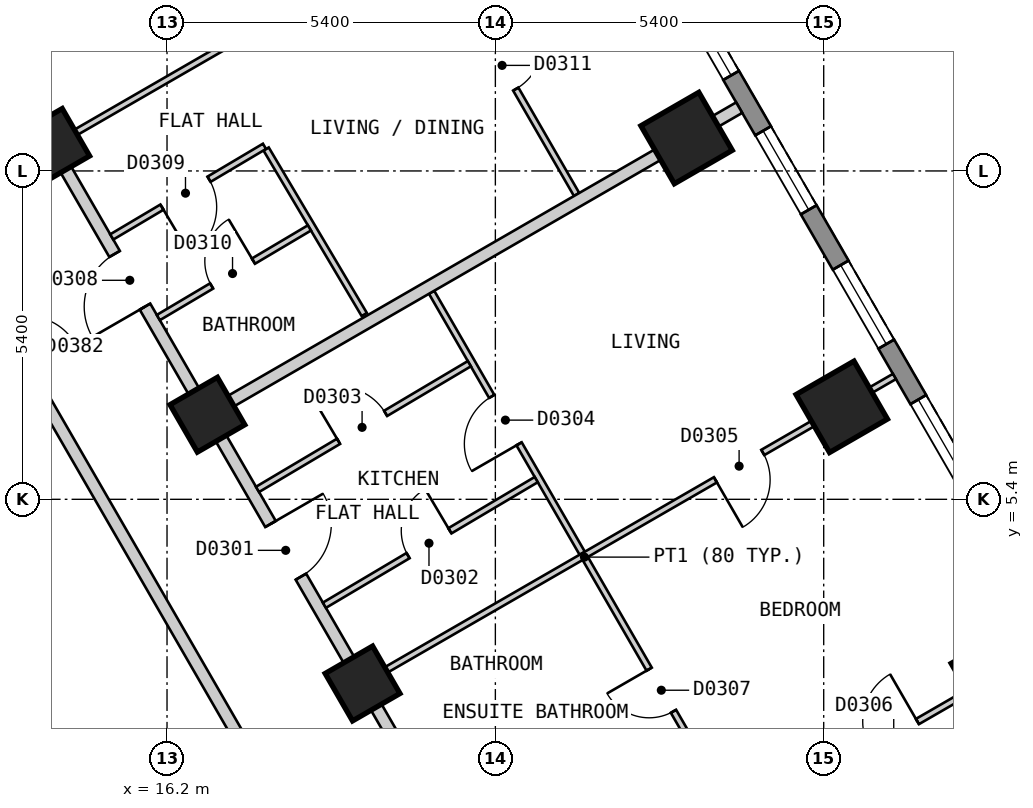
"""IFC4 building model, lengths in metres.
Left out: names, types, materials, properties, quantities, classifications, styles, units other than length and angle.
Written with IfcOpenShell. Run it as: python <this file> out.ifc"""

import sys

from ifc_helpers import new_model, si_unit, direction, frame, frame_2d, origin, origin_2d, place, context, subcontext, project, spatial, polyline, rectangle, outline, extrude, element, fill, save


model = new_model("IFC4")
c1 = context("Model", 3, precision=1e-05, world=origin(), true_north=direction((0.0, 1.0)))
c2 = subcontext(c1, "Body", "Model", "MODEL_VIEW")
j1 = project(units=[si_unit("LENGTHUNIT", "METRE"), si_unit("PLANEANGLEUNIT", "RADIAN")], contexts=[c1])
p1 = place(None, origin())
s1 = spatial("IfcSite", under=j1, at=p1, CompositionType="ELEMENT")
p2 = place(p1, origin())
s2 = spatial("IfcBuilding", under=s1, at=p2, CompositionType="ELEMENT")
p3 = place(p2, frame((0.0, 0.0, 59.4)))
s3 = spatial("IfcBuildingStorey", under=s2, at=p3, CompositionType="ELEMENT", Elevation=59.4)
for number, where, z_axis, x_axis in (
    (1, (29.848, 2.5, 0.0), (0.0, 0.0, 1.0), (-0.5, 0.866, 0.0)),
    (2, (27.297, 6.921, 0.0), (0.0, 0.0, 1.0), (-0.5, 0.866, 0.0)),
    (3, (24.745, 11.341, 0.0), (0.0, 0.0, 1.0), (-0.5, 0.866, 0.0)),
):
    element("IfcColumn", number, at=place(p3, frame(where, z_axis=z_axis, x_axis=x_axis)), inside=s3, PredefinedType="COLUMN", context=c2, shape_type="SweptSolid", body=[
        extrude(rectangle(XDim=1.1, YDim=1.1, at=origin_2d()), origin(), (0.0, 0.0, 1.0), 3.0),
    ])
for number, where, z_axis, x_axis in (
    (4, (19.416, 2.371, 0.0), (0.0, 0.0, 1.0), (-0.5, 0.866, 0.0)),
    (5, (16.864, 6.791, 0.0), (0.0, 0.0, 1.0), (-0.5, 0.866, 0.0)),
    (6, (14.312, 11.211, 0.0), (0.0, 0.0, 1.0), (-0.5, 0.866, 0.0)),
):
    element("IfcColumn", number, at=place(p3, frame(where, z_axis=z_axis, x_axis=x_axis)), inside=s3, PredefinedType="COLUMN", context=c2, shape_type="SweptSolid", body=[
        extrude(rectangle(XDim=0.9, YDim=0.9, at=origin_2d()), origin(), (0.0, 0.0, 1.0), 3.0),
    ])
p4 = place(p3, frame((31.22, 2.425, 0.0), z_axis=(0.0, 0.0, 1.0), x_axis=(-0.500001938803, 0.866024284413, 0.0)))
e7 = element("IfcWall", 7, at=p4, inside=s3, PredefinedType="SOLIDWALL", context=c2, shape_type="SweptSolid", body=[
    extrude(outline(polyline([(0.0, -0.15), (27.02, -0.15), (26.94, 0.15), (0.08, 0.15), (0.0, -0.15)])), origin(), (0.0, 0.0, 1.0), 2.6),
])
p5 = place(p4, frame((1.277, 0.0, 0.15)))
e8 = element("IfcOpeningElement", 8, at=p5, cuts=e7, PredefinedType="OPENING", context=c2, shape_type="SweptSolid", body=[
    extrude(rectangle(XDim=1.5, YDim=2.1, at=frame_2d((0.75, 1.05))), frame((0.0, 0.16, 0.0), z_axis=(0.0, -1.0, 0.0), x_axis=(1.0, 0.0, 0.0)), (0.0, 0.0, 1.0), 0.32),
])
p6 = place(p4, frame((3.829, 0.0, 0.15)))
e9 = element("IfcOpeningElement", 9, at=p6, cuts=e7, PredefinedType="OPENING", context=c2, shape_type="SweptSolid", body=[
    extrude(rectangle(XDim=1.5, YDim=2.1, at=frame_2d((0.75, 1.05))), frame((0.0, 0.16, 0.0), z_axis=(0.0, -1.0, 0.0), x_axis=(1.0, 0.0, 0.0)), (0.0, 0.0, 1.0), 0.32),
])
p7 = place(p4, frame((6.382, 0.0, 0.15)))
e10 = element("IfcOpeningElement", 10, at=p7, cuts=e7, PredefinedType="OPENING", context=c2, shape_type="SweptSolid", body=[
    extrude(rectangle(XDim=1.5, YDim=2.1, at=frame_2d((0.75, 1.05))), frame((0.0, 0.16, 0.0), z_axis=(0.0, -1.0, 0.0), x_axis=(1.0, 0.0, 0.0)), (0.0, 0.0, 1.0), 0.32),
])
p8 = place(p4, frame((8.933, 0.0, 0.15)))
e11 = element("IfcOpeningElement", 11, at=p8, cuts=e7, PredefinedType="OPENING", context=c2, shape_type="SweptSolid", body=[
    extrude(rectangle(XDim=1.5, YDim=2.1, at=frame_2d((0.75, 1.05))), frame((0.0, 0.16, 0.0), z_axis=(0.0, -1.0, 0.0), x_axis=(1.0, 0.0, 0.0)), (0.0, 0.0, 1.0), 0.32),
])
p9 = place(p4, frame((11.485, 0.0, 0.15)))
e12 = element("IfcOpeningElement", 12, at=p9, cuts=e7, PredefinedType="OPENING", context=c2, shape_type="SweptSolid", body=[
    extrude(rectangle(XDim=1.5, YDim=2.1, at=frame_2d((0.75, 1.05))), frame((0.0, 0.16, 0.0), z_axis=(0.0, -1.0, 0.0), x_axis=(1.0, 0.0, 0.0)), (0.0, 0.0, 1.0), 0.32),
])
p10 = place(p4, frame((14.037, 0.0, 0.15)))
e13 = element("IfcOpeningElement", 13, at=p10, cuts=e7, PredefinedType="OPENING", context=c2, shape_type="SweptSolid", body=[
    extrude(rectangle(XDim=1.5, YDim=2.1, at=frame_2d((0.75, 1.05))), frame((0.0, 0.16, 0.0), z_axis=(0.0, -1.0, 0.0), x_axis=(1.0, 0.0, 0.0)), (0.0, 0.0, 1.0), 0.32),
])
p11 = place(p4, frame((16.589, 0.0, 0.15)))
e14 = element("IfcOpeningElement", 14, at=p11, cuts=e7, PredefinedType="OPENING", context=c2, shape_type="SweptSolid", body=[
    extrude(rectangle(XDim=1.5, YDim=2.1, at=frame_2d((0.75, 1.05))), frame((0.0, 0.16, 0.0), z_axis=(0.0, -1.0, 0.0), x_axis=(1.0, 0.0, 0.0)), (0.0, 0.0, 1.0), 0.32),
])
p12 = place(p4, frame((19.141, 0.0, 0.15)))
e15 = element("IfcOpeningElement", 15, at=p12, cuts=e7, PredefinedType="OPENING", context=c2, shape_type="SweptSolid", body=[
    extrude(rectangle(XDim=1.5, YDim=2.1, at=frame_2d((0.75, 1.05))), frame((0.0, 0.16, 0.0), z_axis=(0.0, -1.0, 0.0), x_axis=(1.0, 0.0, 0.0)), (0.0, 0.0, 1.0), 0.32),
])
p13 = place(p4, frame((21.693, 0.0, 0.15)))
e16 = element("IfcOpeningElement", 16, at=p13, cuts=e7, PredefinedType="OPENING", context=c2, shape_type="SweptSolid", body=[
    extrude(rectangle(XDim=1.5, YDim=2.1, at=frame_2d((0.75, 1.05))), frame((0.0, 0.16, 0.0), z_axis=(0.0, -1.0, 0.0), x_axis=(1.0, 0.0, 0.0)), (0.0, 0.0, 1.0), 0.32),
])
p14 = place(p4, frame((24.244, 0.0, 0.15)))
e17 = element("IfcOpeningElement", 17, at=p14, cuts=e7, PredefinedType="OPENING", context=c2, shape_type="SweptSolid", body=[
    extrude(rectangle(XDim=1.5, YDim=2.1, at=frame_2d((0.75, 1.05))), frame((0.0, 0.16, 0.0), z_axis=(0.0, -1.0, 0.0), x_axis=(1.0, 0.0, 0.0)), (0.0, 0.0, 1.0), 0.32),
])
p15 = place(p3, frame((9.18, 15.7, 0.0), z_axis=(0.0, 0.0, 1.0), x_axis=(0.500003652032, -0.866023295272, 0.0)))
e18 = element("IfcWall", 18, at=p15, inside=s3, PredefinedType="PARTITIONING", context=c2, shape_type="SweptSolid", body=[
    extrude(rectangle(XDim=18.012, YDim=0.2, at=frame_2d((9.006, 0.0))), origin(), (0.0, 0.0, 1.0), 2.6),
])
p16 = place(p15, frame((8.556, 0.0, 0.0)))
e19 = element("IfcOpeningElement", 19, at=p16, cuts=e18, PredefinedType="OPENING", context=c2, shape_type="SweptSolid", body=[
    extrude(rectangle(XDim=0.9, YDim=2.1, at=frame_2d((0.45, 1.05))), frame((0.0, 0.11, 0.0), z_axis=(0.0, -1.0, 0.0), x_axis=(1.0, 0.0, 0.0)), (0.0, 0.0, 1.0), 0.22),
])
p17 = place(p3, frame((10.45, 17.9, 0.0), z_axis=(0.0, 0.0, 1.0), x_axis=(0.500034352617, -0.866005569383, 0.0)))
e20 = element("IfcWall", 20, at=p17, inside=s3, PredefinedType="PARTITIONING", context=c2, shape_type="SweptSolid", body=[
    extrude(rectangle(XDim=20.553, YDim=0.2, at=frame_2d((10.276, 0.0))), origin(), (0.0, 0.0, 1.0), 2.6),
])
p18 = place(p17, frame((14.903, 0.0, 0.0)))
e21 = element("IfcOpeningElement", 21, at=p18, cuts=e20, PredefinedType="OPENING", context=c2, shape_type="SweptSolid", body=[
    extrude(rectangle(XDim=1.0, YDim=2.1, at=frame_2d((0.5, 1.05))), frame((0.0, 0.11, 0.0), z_axis=(0.0, -1.0, 0.0), x_axis=(1.0, 0.0, 0.0)), (0.0, 0.0, 1.0), 0.22),
])
p19 = place(p17, frame((9.775, 0.0, 0.0)))
e22 = element("IfcOpeningElement", 22, at=p19, cuts=e20, PredefinedType="OPENING", context=c2, shape_type="SweptSolid", body=[
    extrude(rectangle(XDim=1.0, YDim=2.1, at=frame_2d((0.5, 1.05))), frame((0.0, 0.11, 0.0), z_axis=(0.0, -1.0, 0.0), x_axis=(1.0, 0.0, 0.0)), (0.0, 0.0, 1.0), 0.22),
])
p20 = place(p17, frame((0.852, 0.0, 0.0)))
e23 = element("IfcOpeningElement", 23, at=p20, cuts=e20, PredefinedType="OPENING", context=c2, shape_type="SweptSolid", body=[
    extrude(rectangle(XDim=0.8, YDim=2.1, at=frame_2d((0.4, 1.05))), frame((0.0, 0.11, 0.0), z_axis=(0.0, -1.0, 0.0), x_axis=(1.0, 0.0, 0.0)), (0.0, 0.0, 1.0), 0.22),
])
p21 = place(p3, frame((17.83, 11.161, 0.0), z_axis=(0.0, 0.0, 1.0), x_axis=(0.510041341082, -0.860149888326, 0.0)))
e24 = element("IfcWall", 24, at=p21, inside=s3, PredefinedType="PARTITIONING", context=c2, shape_type="SweptSolid", body=[
    extrude(rectangle(XDim=3.165, YDim=0.1, at=frame_2d((1.582, 0.0))), origin(), (0.0, 0.0, 1.0), 2.6),
])
p22 = place(p3, frame((20.551, 8.805, 0.0), z_axis=(0.0, 0.0, 1.0), x_axis=(0.499984387913, -0.86603441724, 0.0)))
e25 = element("IfcWall", 25, at=p22, inside=s3, PredefinedType="PARTITIONING", context=c2, shape_type="SweptSolid", body=[
    extrude(rectangle(XDim=10.058, YDim=0.1, at=frame_2d((5.029, 0.0))), origin(), (0.0, 0.0, 1.0), 2.6),
])
p23 = place(p22, frame((1.978, 0.0, 0.0)))
e26 = element("IfcOpeningElement", 26, at=p23, cuts=e25, PredefinedType="OPENING", context=c2, shape_type="SweptSolid", body=[
    extrude(rectangle(XDim=0.9, YDim=2.1, at=frame_2d((0.45, 1.05))), frame((0.0, 0.06, 0.0), z_axis=(0.0, -1.0, 0.0), x_axis=(1.0, 0.0, 0.0)), (0.0, 0.0, 1.0), 0.12),
])
p24 = place(p22, frame((7.157, 0.0, 0.0)))
e27 = element("IfcOpeningElement", 27, at=p24, cuts=e25, PredefinedType="OPENING", context=c2, shape_type="SweptSolid", body=[
    extrude(rectangle(XDim=0.8, YDim=2.1, at=frame_2d((0.4, 1.05))), frame((0.0, 0.06, 0.0), z_axis=(0.0, -1.0, 0.0), x_axis=(1.0, 0.0, 0.0)), (0.0, 0.0, 1.0), 0.12),
])
p25 = place(p3, frame((20.46, 14.703, 0.0), z_axis=(0.0, 0.0, 1.0), x_axis=(0.499903082856, -0.866081351693, 0.0)))
e28 = element("IfcWall", 28, at=p25, inside=s3, PredefinedType="PARTITIONING", context=c2, shape_type="SweptSolid", body=[
    extrude(rectangle(XDim=4.953, YDim=0.1, at=frame_2d((2.477, 0.0))), origin(), (0.0, 0.0, 1.0), 2.6),
])
p26 = place(p25, frame((2.052, 0.0, 0.0)))
e29 = element("IfcOpeningElement", 29, at=p26, cuts=e28, PredefinedType="OPENING", context=c2, shape_type="SweptSolid", body=[
    extrude(rectangle(XDim=0.9, YDim=2.1, at=frame_2d((0.45, 1.05))), frame((0.0, 0.06, 0.0), z_axis=(0.0, -1.0, 0.0), x_axis=(1.0, 0.0, 0.0)), (0.0, 0.0, 1.0), 0.12),
])
p27 = place(p3, frame((19.503, 2.421, 0.0), z_axis=(0.0, 0.0, 1.0), x_axis=(0.866083434238, 0.499899474834, 0.0)))
e30 = element("IfcWall", 30, at=p27, inside=s3, PredefinedType="PARTITIONING", context=c2, shape_type="SweptSolid", body=[
    extrude(rectangle(XDim=4.099, YDim=0.1, at=frame_2d((2.049, 0.0))), origin(), (0.0, 0.0, 1.0), 2.6),
])
p28 = place(p3, frame((25.588, 0.041, 0.0), z_axis=(0.0, 0.0, 1.0), x_axis=(0.866113484451, 0.499847408768, 0.0)))
e31 = element("IfcWall", 31, at=p28, inside=s3, PredefinedType="PARTITIONING", context=c2, shape_type="SweptSolid", body=[
    extrude(rectangle(XDim=5.92, YDim=0.1, at=frame_2d((2.96, 0.0))), origin(), (0.0, 0.0, 1.0), 2.6),
])
p29 = place(p28, frame((2.51, 0.0, 0.0)))
e32 = element("IfcOpeningElement", 32, at=p29, cuts=e31, PredefinedType="OPENING", context=c2, shape_type="SweptSolid", body=[
    extrude(rectangle(XDim=0.9, YDim=2.1, at=frame_2d((0.45, 1.05))), frame((0.0, 0.06, 0.0), z_axis=(0.0, -1.0, 0.0), x_axis=(1.0, 0.0, 0.0)), (0.0, 0.0, 1.0), 0.12),
])
p30 = place(p3, frame((14.399, 11.261, 0.0), z_axis=(0.0, 0.0, 1.0), x_axis=(0.866022959057, 0.500004234368, 0.0)))
e33 = element("IfcWall", 33, at=p30, inside=s3, PredefinedType="PARTITIONING", context=c2, shape_type="SweptSolid", body=[
    extrude(rectangle(XDim=10.0, YDim=0.1, at=frame_2d((5.0, 0.0))), origin(), (0.0, 0.0, 1.0), 2.6),
])
p31 = place(p30, frame((4.775, 0.0, 0.0)))
e34 = element("IfcOpeningElement", 34, at=p31, cuts=e33, PredefinedType="OPENING", context=c2, shape_type="SweptSolid", body=[
    extrude(rectangle(XDim=0.9, YDim=2.1, at=frame_2d((0.45, 1.05))), frame((0.0, 0.06, 0.0), z_axis=(0.0, -1.0, 0.0), x_axis=(1.0, 0.0, 0.0)), (0.0, 0.0, 1.0), 0.12),
])
p32 = place(p3, frame((17.688, 5.563, 0.0), z_axis=(0.0, 0.0, 1.0), x_axis=(0.860050619918, 0.510208713351, 0.0)))
e35 = element("IfcWall", 35, at=p32, inside=s3, PredefinedType="PARTITIONING", context=c2, shape_type="SweptSolid", body=[
    extrude(rectangle(XDim=4.051, YDim=0.1, at=frame_2d((2.025, 0.0))), origin(), (0.0, 0.0, 1.0), 2.6),
])
p33 = place(p32, frame((1.55, 0.0, 0.0)))
e36 = element("IfcOpeningElement", 36, at=p33, cuts=e35, PredefinedType="OPENING", context=c2, shape_type="SweptSolid", body=[
    extrude(rectangle(XDim=0.9, YDim=2.1, at=frame_2d((0.45, 1.05))), frame((0.0, 0.06, 0.0), z_axis=(0.0, -1.0, 0.0), x_axis=(1.0, 0.0, 0.0)), (0.0, 0.0, 1.0), 0.12),
])
p34 = place(p3, frame((18.788, 3.658, 0.0), z_axis=(0.0, 0.0, 1.0), x_axis=(0.860114269096, 0.510101405701, 0.0)))
e37 = element("IfcWall", 37, at=p34, inside=s3, PredefinedType="PARTITIONING", context=c2, shape_type="SweptSolid", body=[
    extrude(rectangle(XDim=4.051, YDim=0.1, at=frame_2d((2.025, 0.0))), origin(), (0.0, 0.0, 1.0), 2.6),
])
p35 = place(p34, frame((1.6, 0.0, 0.0)))
e38 = element("IfcOpeningElement", 38, at=p35, cuts=e37, PredefinedType="OPENING", context=c2, shape_type="SweptSolid", body=[
    extrude(rectangle(XDim=0.8, YDim=2.1, at=frame_2d((0.4, 1.05))), frame((0.0, 0.06, 0.0), z_axis=(0.0, -1.0, 0.0), x_axis=(1.0, 0.0, 0.0)), (0.0, 0.0, 1.0), 0.12),
])
p36 = place(p3, frame((16.057, 8.389, 0.0), z_axis=(0.0, 0.0, 1.0), x_axis=(0.860069107001, 0.510177548686, 0.0)))
e39 = element("IfcWall", 39, at=p36, inside=s3, PredefinedType="PARTITIONING", context=c2, shape_type="SweptSolid", body=[
    extrude(rectangle(XDim=2.889, YDim=0.1, at=frame_2d((1.445, 0.0))), origin(), (0.0, 0.0, 1.0), 2.6),
])
p37 = place(p36, frame((1.019, 0.0, 0.0)))
e40 = element("IfcOpeningElement", 40, at=p37, cuts=e39, PredefinedType="OPENING", context=c2, shape_type="SweptSolid", body=[
    extrude(rectangle(XDim=0.8, YDim=2.1, at=frame_2d((0.4, 1.05))), frame((0.0, 0.06, 0.0), z_axis=(0.0, -1.0, 0.0), x_axis=(1.0, 0.0, 0.0)), (0.0, 0.0, 1.0), 0.12),
])
p38 = place(p3, frame((15.291, 9.715, 0.0), z_axis=(0.0, 0.0, 1.0), x_axis=(0.860078277555, 0.510162088436, 0.0)))
e41 = element("IfcWall", 41, at=p38, inside=s3, PredefinedType="PARTITIONING", context=c2, shape_type="SweptSolid", body=[
    extrude(rectangle(XDim=2.921, YDim=0.1, at=frame_2d((1.46, 0.0))), origin(), (0.0, 0.0, 1.0), 2.6),
])
p39 = place(p38, frame((0.96, 0.0, 0.0)))
e42 = element("IfcOpeningElement", 42, at=p39, cuts=e41, PredefinedType="OPENING", context=c2, shape_type="SweptSolid", body=[
    extrude(rectangle(XDim=0.9, YDim=2.1, at=frame_2d((0.45, 1.05))), frame((0.0, 0.06, 0.0), z_axis=(0.0, -1.0, 0.0), x_axis=(1.0, 0.0, 0.0)), (0.0, 0.0, 1.0), 0.12),
])
p40 = place(p3, frame((16.95, 6.841, 0.0), z_axis=(0.0, 0.0, 1.0), x_axis=(0.866022959057, 0.500004234368, 0.0)))
e43 = element("IfcWall", 43, at=p40, inside=s3, PredefinedType="PARTITIONING", context=c2, shape_type="SweptSolid", body=[
    extrude(rectangle(XDim=10.0, YDim=0.2, at=frame_2d((5.0, 0.0))), origin(), (0.0, 0.0, 1.0), 2.6),
])
p41 = place(p3, frame((23.053, 4.47, 0.0), z_axis=(0.0, 0.0, 1.0), x_axis=(0.866052608538, 0.499952877023, 0.0)))
e44 = element("IfcWall", 44, at=p41, inside=s3, PredefinedType="PARTITIONING", context=c2, shape_type="SweptSolid", body=[
    extrude(rectangle(XDim=5.9, YDim=0.1, at=frame_2d((2.95, 0.0))), origin(), (0.0, 0.0, 1.0), 2.6),
])
p42 = place(p41, frame((2.501, 0.0, 0.0)))
e45 = element("IfcOpeningElement", 45, at=p42, cuts=e44, PredefinedType="OPENING", context=c2, shape_type="SweptSolid", body=[
    extrude(rectangle(XDim=0.9, YDim=2.1, at=frame_2d((0.45, 1.05))), frame((0.0, 0.06, 0.0), z_axis=(0.0, -1.0, 0.0), x_axis=(1.0, 0.0, 0.0)), (0.0, 0.0, 1.0), 0.12),
])
p43 = place(p6, origin())
e46 = element("IfcWindow", 46, at=p43, inside=s3, PartitioningType="SINGLE_PANEL", PredefinedType="WINDOW", context=c2, shape_type="SweptSolid", body=[
    extrude(rectangle(XDim=1.5, YDim=2.1, at=frame_2d((0.75, 1.05))), frame((0.0, 0.03, 0.0), z_axis=(0.0, -1.0, 0.0), x_axis=(1.0, 0.0, 0.0)), (0.0, 0.0, 1.0), 0.06),
])
fill(e9, e46)
p44 = place(p7, origin())
e47 = element("IfcWindow", 47, at=p44, inside=s3, PartitioningType="SINGLE_PANEL", PredefinedType="WINDOW", context=c2, shape_type="SweptSolid", body=[
    extrude(rectangle(XDim=1.5, YDim=2.1, at=frame_2d((0.75, 1.05))), frame((0.0, 0.03, 0.0), z_axis=(0.0, -1.0, 0.0), x_axis=(1.0, 0.0, 0.0)), (0.0, 0.0, 1.0), 0.06),
])
fill(e10, e47)
p45 = place(p8, origin())
e48 = element("IfcWindow", 48, at=p45, inside=s3, PartitioningType="SINGLE_PANEL", PredefinedType="WINDOW", context=c2, shape_type="SweptSolid", body=[
    extrude(rectangle(XDim=1.5, YDim=2.1, at=frame_2d((0.75, 1.05))), frame((0.0, 0.03, 0.0), z_axis=(0.0, -1.0, 0.0), x_axis=(1.0, 0.0, 0.0)), (0.0, 0.0, 1.0), 0.06),
])
fill(e11, e48)
p46 = place(p9, origin())
e49 = element("IfcWindow", 49, at=p46, inside=s3, PartitioningType="SINGLE_PANEL", PredefinedType="WINDOW", context=c2, shape_type="SweptSolid", body=[
    extrude(rectangle(XDim=1.5, YDim=2.1, at=frame_2d((0.75, 1.05))), frame((0.0, 0.03, 0.0), z_axis=(0.0, -1.0, 0.0), x_axis=(1.0, 0.0, 0.0)), (0.0, 0.0, 1.0), 0.06),
])
fill(e12, e49)
p47 = place(p18, origin())
e50 = element("IfcDoor", 50, at=p47, inside=s3, OperationType="SINGLE_SWING_LEFT", PredefinedType="DOOR", context=c2, shape_type="SweptSolid", body=[
    extrude(rectangle(XDim=1.0, YDim=2.1, at=frame_2d((0.5, 1.05))), frame((0.0, 0.025, 0.0), z_axis=(0.0, -1.0, 0.0), x_axis=(1.0, 0.0, 0.0)), (0.0, 0.0, 1.0), 0.05),
])
fill(e21, e50)
p48 = place(p35, origin())
e51 = element("IfcDoor", 51, at=p48, inside=s3, OperationType="SINGLE_SWING_RIGHT", PredefinedType="DOOR", context=c2, shape_type="SweptSolid", body=[
    extrude(rectangle(XDim=0.8, YDim=2.1, at=frame_2d((0.4, 1.05))), frame((0.0, 0.025, 0.0), z_axis=(0.0, -1.0, 0.0), x_axis=(1.0, 0.0, 0.0)), (0.0, 0.0, 1.0), 0.05),
])
fill(e38, e51)
p49 = place(p33, origin())
e52 = element("IfcDoor", 52, at=p49, inside=s3, OperationType="SINGLE_SWING_LEFT", PredefinedType="DOOR", context=c2, shape_type="SweptSolid", body=[
    extrude(rectangle(XDim=0.9, YDim=2.1, at=frame_2d((0.45, 1.05))), frame((0.0, 0.025, 0.0), z_axis=(0.0, -1.0, 0.0), x_axis=(1.0, 0.0, 0.0)), (0.0, 0.0, 1.0), 0.05),
])
fill(e36, e52)
p50 = place(p23, origin())
e53 = element("IfcDoor", 53, at=p50, inside=s3, OperationType="SINGLE_SWING_RIGHT", PredefinedType="DOOR", context=c2, shape_type="SweptSolid", body=[
    extrude(rectangle(XDim=0.9, YDim=2.1, at=frame_2d((0.45, 1.05))), frame((0.0, 0.025, 0.0), z_axis=(0.0, -1.0, 0.0), x_axis=(1.0, 0.0, 0.0)), (0.0, 0.0, 1.0), 0.05),
])
fill(e26, e53)
p51 = place(p42, origin())
e54 = element("IfcDoor", 54, at=p51, inside=s3, OperationType="SINGLE_SWING_LEFT", PredefinedType="DOOR", context=c2, shape_type="SweptSolid", body=[
    extrude(rectangle(XDim=0.9, YDim=2.1, at=frame_2d((0.45, 1.05))), frame((0.0, 0.025, 0.0), z_axis=(0.0, -1.0, 0.0), x_axis=(1.0, 0.0, 0.0)), (0.0, 0.0, 1.0), 0.05),
])
fill(e45, e54)
p52 = place(p29, origin())
e55 = element("IfcDoor", 55, at=p52, inside=s3, OperationType="SINGLE_SWING_RIGHT", PredefinedType="DOOR", context=c2, shape_type="SweptSolid", body=[
    extrude(rectangle(XDim=0.9, YDim=2.1, at=frame_2d((0.45, 1.05))), frame((0.0, 0.025, 0.0), z_axis=(0.0, -1.0, 0.0), x_axis=(1.0, 0.0, 0.0)), (0.0, 0.0, 1.0), 0.05),
])
fill(e32, e55)
p53 = place(p24, origin())
e56 = element("IfcDoor", 56, at=p53, inside=s3, OperationType="SINGLE_SWING_LEFT", PredefinedType="DOOR", context=c2, shape_type="SweptSolid", body=[
    extrude(rectangle(XDim=0.8, YDim=2.1, at=frame_2d((0.4, 1.05))), frame((0.0, 0.025, 0.0), z_axis=(0.0, -1.0, 0.0), x_axis=(1.0, 0.0, 0.0)), (0.0, 0.0, 1.0), 0.05),
])
fill(e27, e56)
p54 = place(p19, origin())
e57 = element("IfcDoor", 57, at=p54, inside=s3, OperationType="SINGLE_SWING_RIGHT", PredefinedType="DOOR", context=c2, shape_type="SweptSolid", body=[
    extrude(rectangle(XDim=1.0, YDim=2.1, at=frame_2d((0.5, 1.05))), frame((0.0, 0.025, 0.0), z_axis=(0.0, -1.0, 0.0), x_axis=(1.0, 0.0, 0.0)), (0.0, 0.0, 1.0), 0.05),
])
fill(e22, e57)
p55 = place(p39, origin())
e58 = element("IfcDoor", 58, at=p55, inside=s3, OperationType="SINGLE_SWING_LEFT", PredefinedType="DOOR", context=c2, shape_type="SweptSolid", body=[
    extrude(rectangle(XDim=0.9, YDim=2.1, at=frame_2d((0.45, 1.05))), frame((0.0, 0.025, 0.0), z_axis=(0.0, -1.0, 0.0), x_axis=(1.0, 0.0, 0.0)), (0.0, 0.0, 1.0), 0.05),
])
fill(e42, e58)
p56 = place(p37, origin())
e59 = element("IfcDoor", 59, at=p56, inside=s3, OperationType="SINGLE_SWING_RIGHT", PredefinedType="DOOR", context=c2, shape_type="SweptSolid", body=[
    extrude(rectangle(XDim=0.8, YDim=2.1, at=frame_2d((0.4, 1.05))), frame((0.0, 0.025, 0.0), z_axis=(0.0, -1.0, 0.0), x_axis=(1.0, 0.0, 0.0)), (0.0, 0.0, 1.0), 0.05),
])
fill(e40, e59)
p57 = place(p26, origin())
e60 = element("IfcDoor", 60, at=p57, inside=s3, OperationType="SINGLE_SWING_LEFT", PredefinedType="DOOR", context=c2, shape_type="SweptSolid", body=[
    extrude(rectangle(XDim=0.9, YDim=2.1, at=frame_2d((0.45, 1.05))), frame((0.0, 0.025, 0.0), z_axis=(0.0, -1.0, 0.0), x_axis=(1.0, 0.0, 0.0)), (0.0, 0.0, 1.0), 0.05),
])
fill(e29, e60)
save(model, sys.argv[1])
